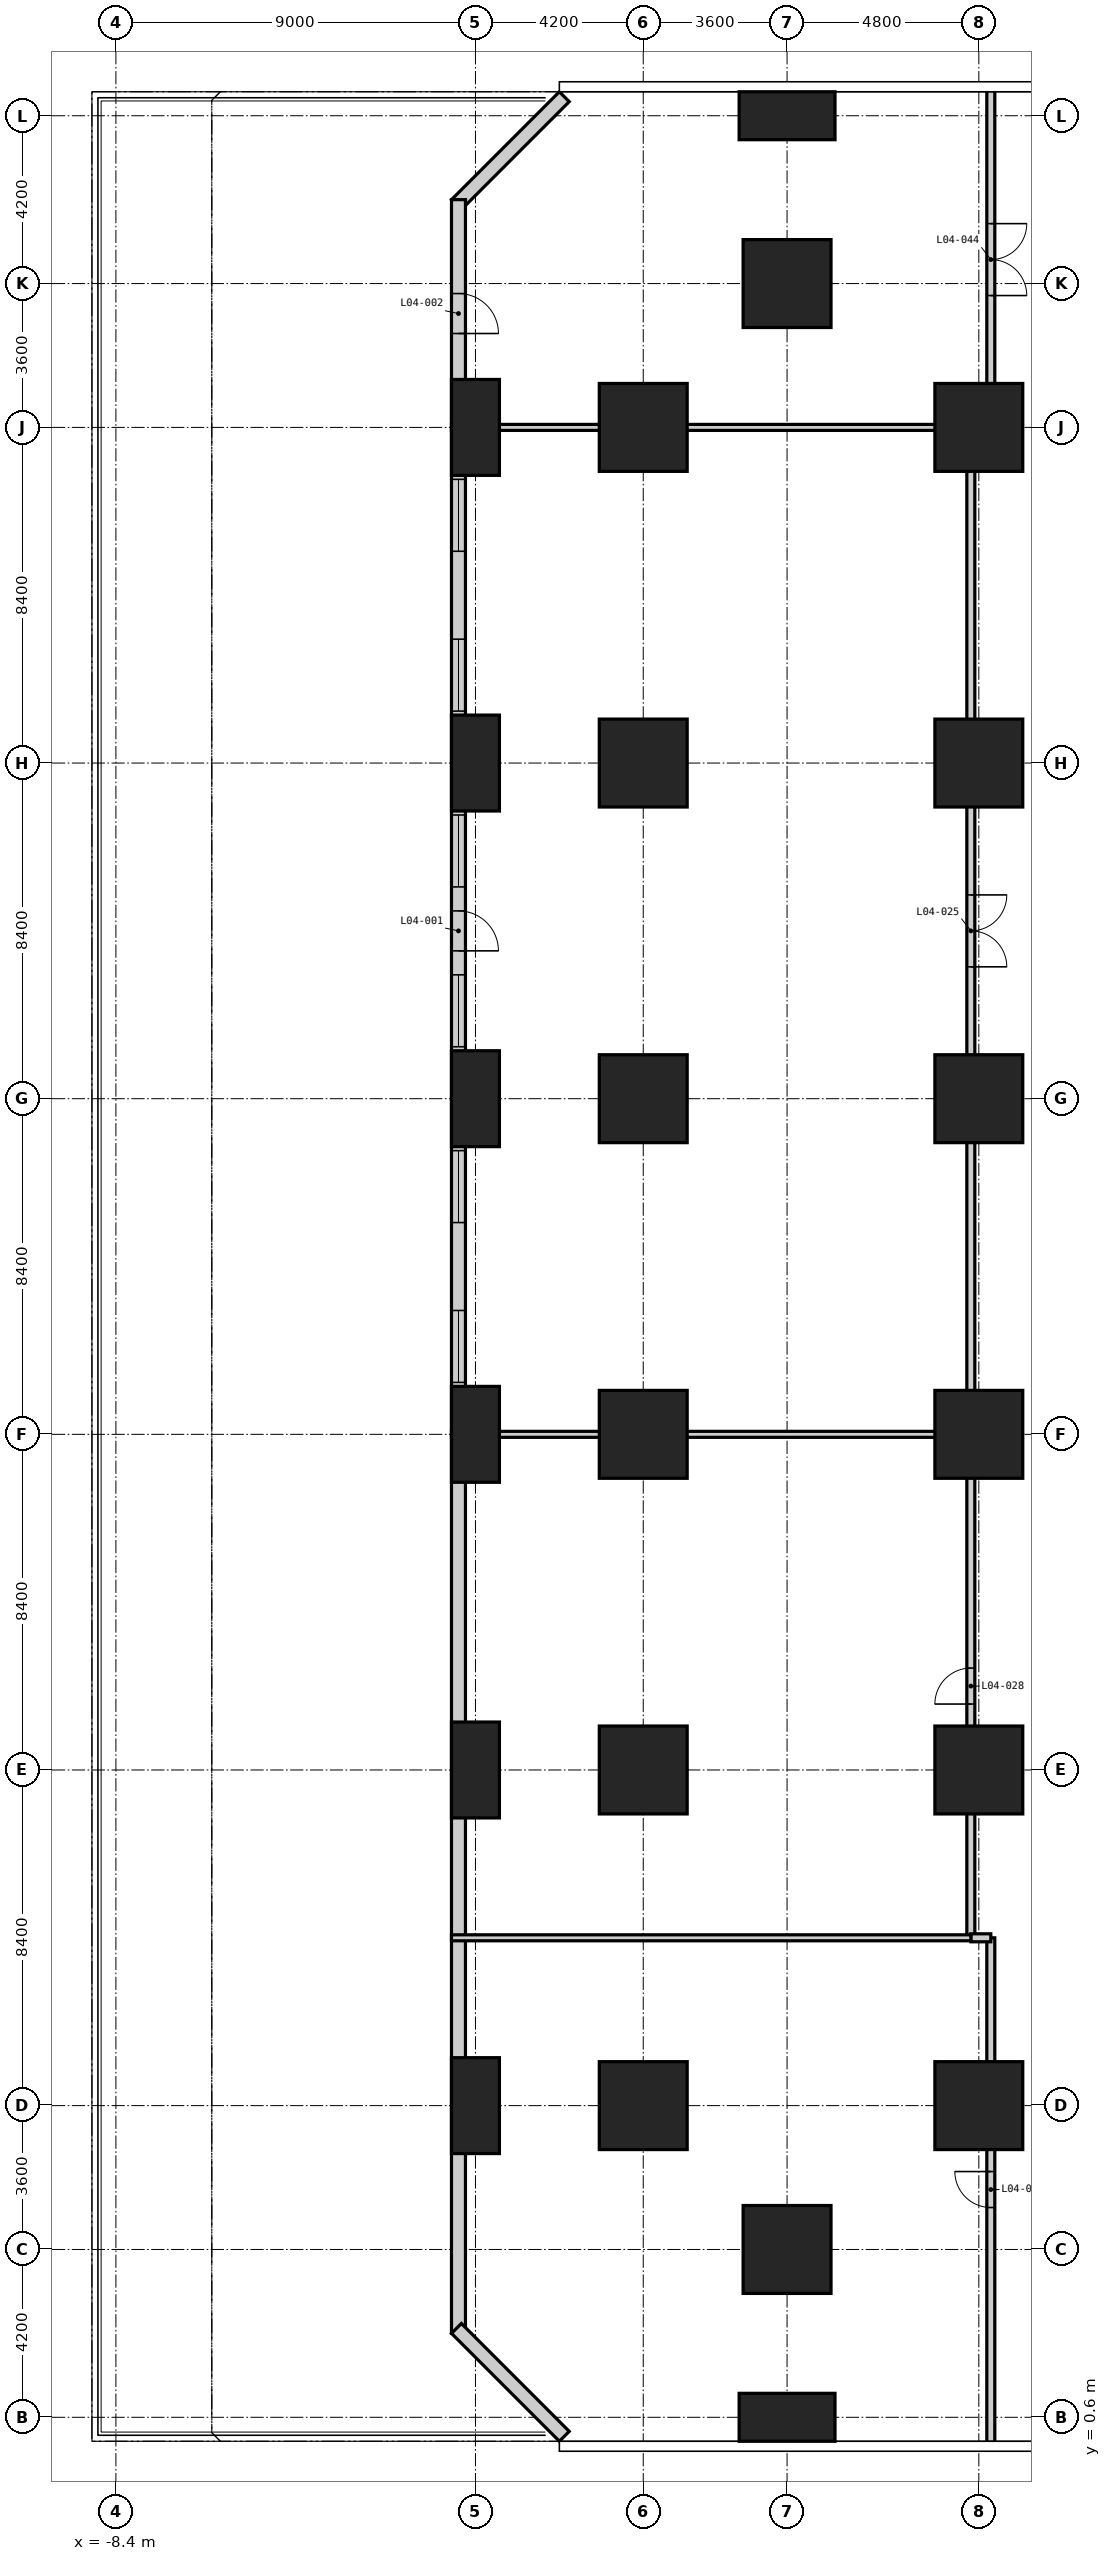
"""IFC4 building model, lengths in metres.
Left out: names, types, materials, properties, quantities, classifications, styles, units other than length and angle.
Written with IfcOpenShell. Run it as: python <this file> out.ifc"""

import sys

from ifc_helpers import new_model, si_unit, direction, frame, frame_2d, origin, origin_2d, place, context, subcontext, project, spatial, rectangle, extrude, element, fill, save


model = new_model("IFC4")
c1 = context("Model", 3, precision=1e-05, world=origin(), true_north=direction((0.0, 1.0)))
c2 = subcontext(c1, "Body", "Model", "MODEL_VIEW")
j1 = project(units=[si_unit("LENGTHUNIT", "METRE"), si_unit("PLANEANGLEUNIT", "RADIAN")], contexts=[c1])
p1 = place(None, origin())
s1 = spatial("IfcSite", under=j1, at=p1, CompositionType="ELEMENT")
p2 = place(p1, origin())
s2 = spatial("IfcBuilding", under=s1, at=p2, CompositionType="ELEMENT")
p3 = place(p2, frame((0.0, 0.0, 22.0)))
s3 = spatial("IfcBuildingStorey", under=s2, at=p3, CompositionType="ELEMENT", Elevation=22.0)
for number, where, z_axis, x_axis in (
    (1, (0.6, 8.4, -0.35), (0.0, 0.0, 1.0), (1.0, 0.0, 0.0)),
    (2, (0.6, 16.8, -0.35), (0.0, 0.0, 1.0), (1.0, 0.0, 0.0)),
    (3, (0.6, 25.2, -0.35), (0.0, 0.0, 1.0), (1.0, 0.0, 0.0)),
    (4, (0.6, 33.6, -0.35), (0.0, 0.0, 1.0), (1.0, 0.0, 0.0)),
    (5, (0.6, 42.0, -0.35), (0.0, 0.0, 1.0), (1.0, 0.0, 0.0)),
    (6, (0.6, 50.4, -0.35), (0.0, 0.0, 1.0), (1.0, 0.0, 0.0)),
):
    element("IfcColumn", number, at=place(p3, frame(where, z_axis=z_axis, x_axis=x_axis)), inside=s3, PredefinedType="COLUMN", context=c2, shape_type="SweptSolid", body=[
        extrude(rectangle(XDim=1.2, YDim=2.4, at=origin_2d()), origin(), (0.0, 0.0, 1.0), 5.0),
    ])
for number, where, z_axis, x_axis in (
    (7, (4.8, 8.4, -0.35), (0.0, 0.0, 1.0), (1.0, 0.0, 0.0)),
    (8, (4.8, 16.8, -0.35), (0.0, 0.0, 1.0), (1.0, 0.0, 0.0)),
    (9, (4.8, 25.2, -0.35), (0.0, 0.0, 1.0), (1.0, 0.0, 0.0)),
    (10, (4.8, 33.6, -0.35), (0.0, 0.0, 1.0), (1.0, 0.0, 0.0)),
    (11, (4.8, 42.0, -0.35), (0.0, 0.0, 1.0), (1.0, 0.0, 0.0)),
    (12, (4.8, 50.4, -0.35), (0.0, 0.0, 1.0), (1.0, 0.0, 0.0)),
):
    element("IfcColumn", number, at=place(p3, frame(where, z_axis=z_axis, x_axis=x_axis)), inside=s3, PredefinedType="COLUMN", context=c2, shape_type="SweptSolid", body=[
        extrude(rectangle(XDim=2.2, YDim=2.2, at=origin_2d()), origin(), (0.0, 0.0, 1.0), 5.0),
    ])
p4 = place(p3, frame((8.4, 0.6, -0.35), z_axis=(0.0, 0.0, 1.0), x_axis=(1.0, 0.0, 0.0)))
e13 = element("IfcColumn", 13, at=p4, inside=s3, PredefinedType="COLUMN", context=c2, shape_type="SweptSolid", body=[
    extrude(rectangle(XDim=2.4, YDim=1.2, at=origin_2d()), origin(), (0.0, 0.0, 1.0), 5.0),
])
for number, where, z_axis, x_axis in (
    (14, (8.4, 4.8, -0.35), (0.0, 0.0, 1.0), (1.0, 0.0, 0.0)),
    (15, (8.4, 54.0, -0.35), (0.0, 0.0, 1.0), (1.0, 0.0, 0.0)),
):
    element("IfcColumn", number, at=place(p3, frame(where, z_axis=z_axis, x_axis=x_axis)), inside=s3, PredefinedType="COLUMN", context=c2, shape_type="SweptSolid", body=[
        extrude(rectangle(XDim=2.2, YDim=2.2, at=origin_2d()), origin(), (0.0, 0.0, 1.0), 5.0),
    ])
p5 = place(p3, frame((8.4, 58.2, -0.35), z_axis=(0.0, 0.0, 1.0), x_axis=(1.0, 0.0, 0.0)))
e16 = element("IfcColumn", 16, at=p5, inside=s3, PredefinedType="COLUMN", context=c2, shape_type="SweptSolid", body=[
    extrude(rectangle(XDim=2.4, YDim=1.2, at=origin_2d()), origin(), (0.0, 0.0, 1.0), 5.0),
])
for number, where, z_axis, x_axis in (
    (17, (13.2, 8.4, -0.35), (0.0, 0.0, 1.0), (1.0, 0.0, 0.0)),
    (18, (13.2, 16.8, -0.35), (0.0, 0.0, 1.0), (1.0, 0.0, 0.0)),
    (19, (13.2, 25.2, -0.35), (0.0, 0.0, 1.0), (1.0, 0.0, 0.0)),
    (20, (13.2, 33.6, -0.35), (0.0, 0.0, 1.0), (1.0, 0.0, 0.0)),
    (21, (13.2, 42.0, -0.35), (0.0, 0.0, 1.0), (1.0, 0.0, 0.0)),
    (22, (13.2, 50.4, -0.35), (0.0, 0.0, 1.0), (1.0, 0.0, 0.0)),
):
    element("IfcColumn", number, at=place(p3, frame(where, z_axis=z_axis, x_axis=x_axis)), inside=s3, PredefinedType="COLUMN", context=c2, shape_type="SweptSolid", body=[
        extrude(rectangle(XDim=2.2, YDim=2.2, at=origin_2d()), origin(), (0.0, 0.0, 1.0), 5.0),
    ])
p6 = place(p3, frame((2.824, 58.676, 0.0), z_axis=(0.0, 0.0, 1.0), x_axis=(-0.707106781187, -0.707106781187, 0.0)))
e23 = element("IfcWall", 23, at=p6, inside=s3, PredefinedType="SOLIDWALL", context=c2, shape_type="SweptSolid", body=[
    extrude(rectangle(XDim=3.818, YDim=0.35, at=frame_2d((1.909, 0.0))), origin(), (0.0, 0.0, 1.0), 4.65),
])
p7 = place(p3, frame((0.175, 56.1, 0.0), z_axis=(0.0, 0.0, 1.0), x_axis=(0.0, -1.0, 0.0)))
e24 = element("IfcWall", 24, at=p7, inside=s3, PredefinedType="SOLIDWALL", context=c2, shape_type="SweptSolid", body=[
    extrude(rectangle(XDim=53.4, YDim=0.35, at=frame_2d((26.7, 0.0))), origin(), (0.0, 0.0, 1.0), 4.65),
])
p8 = place(p7, frame((17.8, 0.0, 0.0)))
e25 = element("IfcOpeningElement", 25, at=p8, cuts=e24, PredefinedType="OPENING", context=c2, shape_type="SweptSolid", body=[
    extrude(rectangle(XDim=1.0, YDim=2.4, at=frame_2d((0.5, 1.2))), frame((0.0, 0.185, 0.0), z_axis=(0.0, -1.0, 0.0), x_axis=(1.0, 0.0, 0.0)), (0.0, 0.0, 1.0), 0.37),
])
p9 = place(p7, frame((27.8, 0.0, 0.6)))
e26 = element("IfcOpeningElement", 26, at=p9, cuts=e24, PredefinedType="OPENING", context=c2, shape_type="SweptSolid", body=[
    extrude(rectangle(XDim=1.8, YDim=2.1, at=frame_2d((0.9, 1.05))), frame((0.0, 0.185, 0.0), z_axis=(0.0, -1.0, 0.0), x_axis=(1.0, 0.0, 0.0)), (0.0, 0.0, 1.0), 0.37),
])
p10 = place(p7, frame((23.8, 0.0, 0.6)))
e27 = element("IfcOpeningElement", 27, at=p10, cuts=e24, PredefinedType="OPENING", context=c2, shape_type="SweptSolid", body=[
    extrude(rectangle(XDim=1.8, YDim=2.1, at=frame_2d((0.9, 1.05))), frame((0.0, 0.185, 0.0), z_axis=(0.0, -1.0, 0.0), x_axis=(1.0, 0.0, 0.0)), (0.0, 0.0, 1.0), 0.37),
])
p11 = place(p7, frame((19.4, 0.0, 0.6)))
e28 = element("IfcOpeningElement", 28, at=p11, cuts=e24, PredefinedType="OPENING", context=c2, shape_type="SweptSolid", body=[
    extrude(rectangle(XDim=1.8, YDim=2.1, at=frame_2d((0.9, 1.05))), frame((0.0, 0.185, 0.0), z_axis=(0.0, -1.0, 0.0), x_axis=(1.0, 0.0, 0.0)), (0.0, 0.0, 1.0), 0.37),
])
p12 = place(p7, frame((15.4, 0.0, 0.6)))
e29 = element("IfcOpeningElement", 29, at=p12, cuts=e24, PredefinedType="OPENING", context=c2, shape_type="SweptSolid", body=[
    extrude(rectangle(XDim=1.8, YDim=2.1, at=frame_2d((0.9, 1.05))), frame((0.0, 0.185, 0.0), z_axis=(0.0, -1.0, 0.0), x_axis=(1.0, 0.0, 0.0)), (0.0, 0.0, 1.0), 0.37),
])
p13 = place(p7, frame((11.0, 0.0, 0.6)))
e30 = element("IfcOpeningElement", 30, at=p13, cuts=e24, PredefinedType="OPENING", context=c2, shape_type="SweptSolid", body=[
    extrude(rectangle(XDim=1.8, YDim=2.1, at=frame_2d((0.9, 1.05))), frame((0.0, 0.185, 0.0), z_axis=(0.0, -1.0, 0.0), x_axis=(1.0, 0.0, 0.0)), (0.0, 0.0, 1.0), 0.37),
])
p14 = place(p7, frame((7.0, 0.0, 0.6)))
e31 = element("IfcOpeningElement", 31, at=p14, cuts=e24, PredefinedType="OPENING", context=c2, shape_type="SweptSolid", body=[
    extrude(rectangle(XDim=1.8, YDim=2.1, at=frame_2d((0.9, 1.05))), frame((0.0, 0.185, 0.0), z_axis=(0.0, -1.0, 0.0), x_axis=(1.0, 0.0, 0.0)), (0.0, 0.0, 1.0), 0.37),
])
p15 = place(p7, frame((2.35, 0.0, 0.0)))
e32 = element("IfcOpeningElement", 32, at=p15, cuts=e24, PredefinedType="OPENING", context=c2, shape_type="SweptSolid", body=[
    extrude(rectangle(XDim=1.0, YDim=2.4, at=frame_2d((0.5, 1.2))), frame((0.0, 0.185, 0.0), z_axis=(0.0, -1.0, 0.0), x_axis=(1.0, 0.0, 0.0)), (0.0, 0.0, 1.0), 0.37),
])
p16 = place(p3, frame((0.124, 2.824, 0.0), z_axis=(0.0, 0.0, 1.0), x_axis=(0.707106781187, -0.707106781187, 0.0)))
e33 = element("IfcWall", 33, at=p16, inside=s3, PredefinedType="SOLIDWALL", context=c2, shape_type="SweptSolid", body=[
    extrude(rectangle(XDim=3.818, YDim=0.35, at=frame_2d((1.909, 0.0))), origin(), (0.0, 0.0, 1.0), 4.65),
])
p17 = place(p3, frame((13.0, 12.6, 0.0), z_axis=(0.0, 0.0, 1.0), x_axis=(0.0, 1.0, 0.0)))
e34 = element("IfcWall", 34, at=p17, inside=s3, PredefinedType="PARTITIONING", context=c2, shape_type="SweptSolid", body=[
    extrude(rectangle(XDim=12.6, YDim=0.2, at=frame_2d((6.3, 0.0))), origin(), (0.0, 0.0, 1.0), 4.65),
])
p18 = place(p17, frame((5.85, 0.0, 0.0)))
e35 = element("IfcOpeningElement", 35, at=p18, cuts=e34, PredefinedType="OPENING", context=c2, shape_type="SweptSolid", body=[
    extrude(rectangle(XDim=0.9, YDim=2.1, at=frame_2d((0.45, 1.05))), frame((0.0, 0.11, 0.0), z_axis=(0.0, -1.0, 0.0), x_axis=(1.0, 0.0, 0.0)), (0.0, 0.0, 1.0), 0.22),
])
p19 = place(p3, frame((13.5, -0.023, 0.0), z_axis=(0.0, 0.0, 1.0), x_axis=(0.0, 1.0, 0.0)))
e36 = element("IfcWall", 36, at=p19, inside=s3, PredefinedType="PARTITIONING", context=c2, shape_type="SweptSolid", body=[
    extrude(rectangle(XDim=12.623, YDim=0.2, at=frame_2d((6.312, 0.0))), origin(), (0.0, 0.0, 1.0), 4.65),
])
p20 = place(p19, frame((5.873, 0.0, 0.0)))
e37 = element("IfcOpeningElement", 37, at=p20, cuts=e36, PredefinedType="OPENING", context=c2, shape_type="SweptSolid", body=[
    extrude(rectangle(XDim=0.9, YDim=2.1, at=frame_2d((0.45, 1.05))), frame((0.0, 0.11, 0.0), z_axis=(0.0, -1.0, 0.0), x_axis=(1.0, 0.0, 0.0)), (0.0, 0.0, 1.0), 0.22),
])
p21 = place(p3, frame((13.0, 12.6, 0.0), z_axis=(0.0, 0.0, 1.0), x_axis=(1.0, 0.0, 0.0)))
e38 = element("IfcWall", 38, at=p21, inside=s3, PredefinedType="PARTITIONING", context=c2, shape_type="SweptSolid", body=[
    extrude(rectangle(XDim=0.5, YDim=0.2, at=frame_2d((0.25, 0.0))), origin(), (0.0, 0.0, 1.0), 4.65),
])
p22 = place(p3, frame((13.0, 50.4, 0.0), z_axis=(0.0, 0.0, 1.0), x_axis=(0.0, -1.0, 0.0)))
e39 = element("IfcWall", 39, at=p22, inside=s3, PredefinedType="PARTITIONING", context=c2, shape_type="SweptSolid", body=[
    extrude(rectangle(XDim=25.2, YDim=0.2, at=frame_2d((12.6, 0.0))), origin(), (0.0, 0.0, 1.0), 4.65),
])
p23 = place(p22, frame((11.7, 0.0, 0.0)))
e40 = element("IfcOpeningElement", 40, at=p23, cuts=e39, PredefinedType="OPENING", context=c2, shape_type="SweptSolid", body=[
    extrude(rectangle(XDim=1.8, YDim=2.4, at=frame_2d((0.9, 1.2))), frame((0.0, 0.11, 0.0), z_axis=(0.0, -1.0, 0.0), x_axis=(1.0, 0.0, 0.0)), (0.0, 0.0, 1.0), 0.22),
])
p24 = place(p3, frame((13.5, 58.823, 0.0), z_axis=(0.0, 0.0, 1.0), x_axis=(0.0, -1.0, 0.0)))
e41 = element("IfcWall", 41, at=p24, inside=s3, PredefinedType="PARTITIONING", context=c2, shape_type="SweptSolid", body=[
    extrude(rectangle(XDim=8.423, YDim=0.2, at=frame_2d((4.211, 0.0))), origin(), (0.0, 0.0, 1.0), 4.65),
])
p25 = place(p24, frame((3.323, 0.0, 0.0)))
e42 = element("IfcOpeningElement", 42, at=p25, cuts=e41, PredefinedType="OPENING", context=c2, shape_type="SweptSolid", body=[
    extrude(rectangle(XDim=1.8, YDim=2.4, at=frame_2d((0.9, 1.2))), frame((0.0, 0.11, 0.0), z_axis=(0.0, -1.0, 0.0), x_axis=(1.0, 0.0, 0.0)), (0.0, 0.0, 1.0), 0.22),
])
p26 = place(p3, frame((13.5, 50.4, 0.0), z_axis=(0.0, 0.0, 1.0), x_axis=(-1.0, 0.0, 0.0)))
e43 = element("IfcWall", 43, at=p26, inside=s3, PredefinedType="PARTITIONING", context=c2, shape_type="SweptSolid", body=[
    extrude(rectangle(XDim=0.5, YDim=0.2, at=frame_2d((0.25, 0.0))), origin(), (0.0, 0.0, 1.0), 4.65),
])
for number, where, z_axis, x_axis in (
    (44, (0.0, 12.6, 0.0), (0.0, 0.0, 1.0), (1.0, 0.0, 0.0)),
    (45, (0.0, 25.2, 0.0), (0.0, 0.0, 1.0), (1.0, 0.0, 0.0)),
    (46, (0.0, 50.4, 0.0), (0.0, 0.0, 1.0), (1.0, 0.0, 0.0)),
):
    element("IfcWall", number, at=place(p3, frame(where, z_axis=z_axis, x_axis=x_axis)), inside=s3, PredefinedType="PARTITIONING", context=c2, shape_type="SweptSolid", body=[
        extrude(rectangle(XDim=13.0, YDim=0.15, at=frame_2d((6.5, 0.0))), origin(), (0.0, 0.0, 1.0), 4.65),
    ])
p27 = place(p8, origin())
e47 = element("IfcDoor", 47, at=p27, inside=s3, OperationType="SINGLE_SWING_RIGHT", PredefinedType="DOOR", context=c2, shape_type="SweptSolid", body=[
    extrude(rectangle(XDim=1.0, YDim=2.4, at=frame_2d((0.5, 1.2))), frame((0.0, 0.025, 0.0), z_axis=(0.0, -1.0, 0.0), x_axis=(1.0, 0.0, 0.0)), (0.0, 0.0, 1.0), 0.05),
])
fill(e25, e47)
p28 = place(p9, origin())
e48 = element("IfcWindow", 48, at=p28, inside=s3, PartitioningType="SINGLE_PANEL", PredefinedType="WINDOW", context=c2, shape_type="SweptSolid", body=[
    extrude(rectangle(XDim=1.8, YDim=2.1, at=frame_2d((0.9, 1.05))), frame((0.0, 0.03, 0.0), z_axis=(0.0, -1.0, 0.0), x_axis=(1.0, 0.0, 0.0)), (0.0, 0.0, 1.0), 0.06),
])
fill(e26, e48)
p29 = place(p10, origin())
e49 = element("IfcWindow", 49, at=p29, inside=s3, PartitioningType="SINGLE_PANEL", PredefinedType="WINDOW", context=c2, shape_type="SweptSolid", body=[
    extrude(rectangle(XDim=1.8, YDim=2.1, at=frame_2d((0.9, 1.05))), frame((0.0, 0.03, 0.0), z_axis=(0.0, -1.0, 0.0), x_axis=(1.0, 0.0, 0.0)), (0.0, 0.0, 1.0), 0.06),
])
fill(e27, e49)
p30 = place(p11, origin())
e50 = element("IfcWindow", 50, at=p30, inside=s3, PartitioningType="SINGLE_PANEL", PredefinedType="WINDOW", context=c2, shape_type="SweptSolid", body=[
    extrude(rectangle(XDim=1.8, YDim=2.1, at=frame_2d((0.9, 1.05))), frame((0.0, 0.03, 0.0), z_axis=(0.0, -1.0, 0.0), x_axis=(1.0, 0.0, 0.0)), (0.0, 0.0, 1.0), 0.06),
])
fill(e28, e50)
p31 = place(p12, origin())
e51 = element("IfcWindow", 51, at=p31, inside=s3, PartitioningType="SINGLE_PANEL", PredefinedType="WINDOW", context=c2, shape_type="SweptSolid", body=[
    extrude(rectangle(XDim=1.8, YDim=2.1, at=frame_2d((0.9, 1.05))), frame((0.0, 0.03, 0.0), z_axis=(0.0, -1.0, 0.0), x_axis=(1.0, 0.0, 0.0)), (0.0, 0.0, 1.0), 0.06),
])
fill(e29, e51)
p32 = place(p13, origin())
e52 = element("IfcWindow", 52, at=p32, inside=s3, PartitioningType="SINGLE_PANEL", PredefinedType="WINDOW", context=c2, shape_type="SweptSolid", body=[
    extrude(rectangle(XDim=1.8, YDim=2.1, at=frame_2d((0.9, 1.05))), frame((0.0, 0.03, 0.0), z_axis=(0.0, -1.0, 0.0), x_axis=(1.0, 0.0, 0.0)), (0.0, 0.0, 1.0), 0.06),
])
fill(e30, e52)
p33 = place(p14, origin())
e53 = element("IfcWindow", 53, at=p33, inside=s3, PartitioningType="SINGLE_PANEL", PredefinedType="WINDOW", context=c2, shape_type="SweptSolid", body=[
    extrude(rectangle(XDim=1.8, YDim=2.1, at=frame_2d((0.9, 1.05))), frame((0.0, 0.03, 0.0), z_axis=(0.0, -1.0, 0.0), x_axis=(1.0, 0.0, 0.0)), (0.0, 0.0, 1.0), 0.06),
])
fill(e31, e53)
p34 = place(p15, origin())
e54 = element("IfcDoor", 54, at=p34, inside=s3, OperationType="SINGLE_SWING_RIGHT", PredefinedType="DOOR", context=c2, shape_type="SweptSolid", body=[
    extrude(rectangle(XDim=1.0, YDim=2.4, at=frame_2d((0.5, 1.2))), frame((0.0, 0.025, 0.0), z_axis=(0.0, -1.0, 0.0), x_axis=(1.0, 0.0, 0.0)), (0.0, 0.0, 1.0), 0.05),
])
fill(e32, e54)
p35 = place(p23, origin())
e55 = element("IfcDoor", 55, at=p35, inside=s3, OperationType="DOUBLE_DOOR_DOUBLE_SWING", PredefinedType="DOOR", context=c2, shape_type="SweptSolid", body=[
    extrude(rectangle(XDim=1.8, YDim=2.4, at=frame_2d((0.9, 1.2))), frame((0.0, 0.025, 0.0), z_axis=(0.0, -1.0, 0.0), x_axis=(1.0, 0.0, 0.0)), (0.0, 0.0, 1.0), 0.05),
])
fill(e40, e55)
p36 = place(p20, origin())
e56 = element("IfcDoor", 56, at=p36, inside=s3, OperationType="SINGLE_SWING_RIGHT", PredefinedType="DOOR", context=c2, shape_type="SweptSolid", body=[
    extrude(rectangle(XDim=0.9, YDim=2.1, at=frame_2d((0.45, 1.05))), frame((0.0, 0.025, 0.0), z_axis=(0.0, -1.0, 0.0), x_axis=(1.0, 0.0, 0.0)), (0.0, 0.0, 1.0), 0.05),
])
fill(e37, e56)
p37 = place(p18, origin())
e57 = element("IfcDoor", 57, at=p37, inside=s3, OperationType="SINGLE_SWING_LEFT", PredefinedType="DOOR", context=c2, shape_type="SweptSolid", body=[
    extrude(rectangle(XDim=0.9, YDim=2.1, at=frame_2d((0.45, 1.05))), frame((0.0, 0.025, 0.0), z_axis=(0.0, -1.0, 0.0), x_axis=(1.0, 0.0, 0.0)), (0.0, 0.0, 1.0), 0.05),
])
fill(e35, e57)
p38 = place(p25, origin())
e58 = element("IfcDoor", 58, at=p38, inside=s3, OperationType="DOUBLE_DOOR_DOUBLE_SWING", PredefinedType="DOOR", context=c2, shape_type="SweptSolid", body=[
    extrude(rectangle(XDim=1.8, YDim=2.4, at=frame_2d((0.9, 1.2))), frame((0.0, 0.025, 0.0), z_axis=(0.0, -1.0, 0.0), x_axis=(1.0, 0.0, 0.0)), (0.0, 0.0, 1.0), 0.05),
])
fill(e42, e58)
save(model, sys.argv[1])
